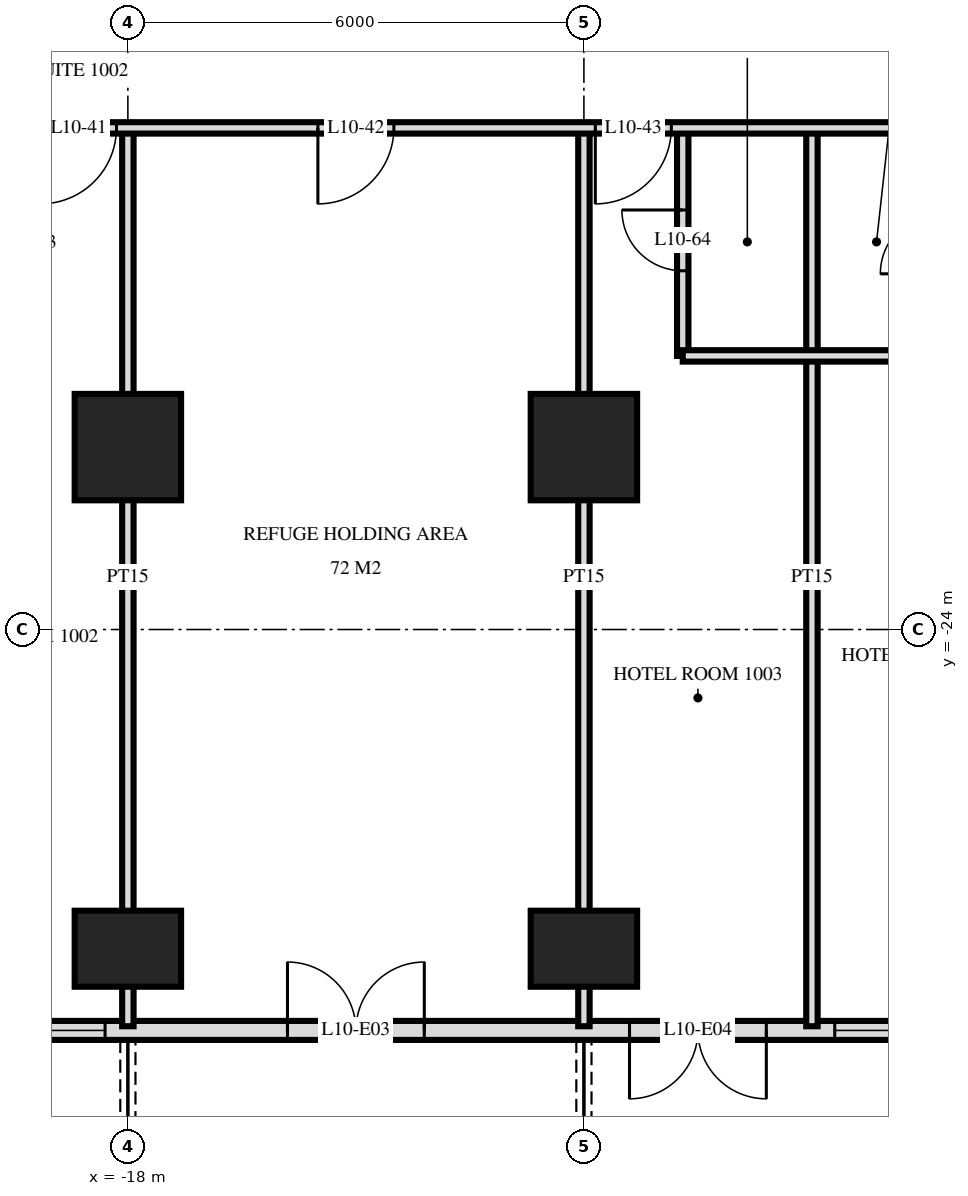
"""IFC4 building model, lengths in metres.
Left out: names, types, materials, properties, quantities, classifications, styles, units other than length and angle.
Written with IfcOpenShell. Run it as: python <this file> out.ifc"""

import sys

from ifc_helpers import new_model, si_unit, direction, frame, frame_2d, origin, origin_2d, place, context, subcontext, project, spatial, rectangle, extrude, element, fill, save


model = new_model("IFC4")
c1 = context("Model", 3, precision=1e-05, world=origin(), true_north=direction((0.0, 1.0)))
c2 = subcontext(c1, "Body", "Model", "MODEL_VIEW")
j1 = project(units=[si_unit("LENGTHUNIT", "METRE"), si_unit("PLANEANGLEUNIT", "RADIAN")], contexts=[c1])
p1 = place(None, origin())
s1 = spatial("IfcSite", under=j1, at=p1, CompositionType="ELEMENT")
p2 = place(p1, origin())
s2 = spatial("IfcBuilding", under=s1, at=p2, CompositionType="ELEMENT")
p3 = place(p2, frame((0.0, 0.0, 45.6)))
s3 = spatial("IfcBuildingStorey", under=s2, at=p3, CompositionType="ELEMENT", Elevation=45.6)
p4 = place(p3, frame((-18.0, -28.2, 0.0), z_axis=(0.0, 0.0, 1.0), x_axis=(1.0, 0.0, 0.0)))
e1 = element("IfcColumn", 1, at=p4, inside=s3, PredefinedType="COLUMN", context=c2, shape_type="SweptSolid", body=[
    extrude(rectangle(XDim=1.4, YDim=1.0, at=origin_2d()), origin(), (0.0, 0.0, 1.0), 3.6),
])
p5 = place(p3, frame((-18.0, -21.6, 0.0), z_axis=(0.0, 0.0, 1.0), x_axis=(1.0, 0.0, 0.0)))
e2 = element("IfcColumn", 2, at=p5, inside=s3, PredefinedType="COLUMN", context=c2, shape_type="SweptSolid", body=[
    extrude(rectangle(XDim=1.4, YDim=1.4, at=origin_2d()), origin(), (0.0, 0.0, 1.0), 3.6),
])
p6 = place(p3, frame((-12.0, -28.2, 0.0), z_axis=(0.0, 0.0, 1.0), x_axis=(1.0, 0.0, 0.0)))
e3 = element("IfcColumn", 3, at=p6, inside=s3, PredefinedType="COLUMN", context=c2, shape_type="SweptSolid", body=[
    extrude(rectangle(XDim=1.4, YDim=1.0, at=origin_2d()), origin(), (0.0, 0.0, 1.0), 3.6),
])
p7 = place(p3, frame((-12.0, -21.6, 0.0), z_axis=(0.0, 0.0, 1.0), x_axis=(1.0, 0.0, 0.0)))
e4 = element("IfcColumn", 4, at=p7, inside=s3, PredefinedType="COLUMN", context=c2, shape_type="SweptSolid", body=[
    extrude(rectangle(XDim=1.4, YDim=1.4, at=origin_2d()), origin(), (0.0, 0.0, 1.0), 3.6),
])
p8 = place(p3, frame((-28.775, -29.275, 0.0), z_axis=(0.0, 0.0, 1.0), x_axis=(1.0, 0.0, 0.0)))
e5 = element("IfcWall", 5, at=p8, inside=s3, PredefinedType="SOLIDWALL", context=c2, shape_type="SweptSolid", body=[
    extrude(rectangle(XDim=57.551, YDim=0.25, at=frame_2d((28.775, 0.0))), origin(), (0.0, 0.0, 1.0), 3.32),
])
p9 = place(p8, frame((0.575, 0.0, 0.0)))
e6 = element("IfcOpeningElement", 6, at=p9, cuts=e5, PredefinedType="OPENING", context=c2, shape_type="SweptSolid", body=[
    extrude(rectangle(XDim=1.8, YDim=2.4, at=frame_2d((0.9, 1.2))), frame((0.0, 0.135, 0.0), z_axis=(0.0, -1.0, 0.0), x_axis=(1.0, 0.0, 0.0)), (0.0, 0.0, 1.0), 0.27),
])
p10 = place(p8, frame((5.375, 0.0, 0.0)))
e7 = element("IfcOpeningElement", 7, at=p10, cuts=e5, PredefinedType="OPENING", context=c2, shape_type="SweptSolid", body=[
    extrude(rectangle(XDim=1.8, YDim=2.4, at=frame_2d((0.9, 1.2))), frame((0.0, 0.135, 0.0), z_axis=(0.0, -1.0, 0.0), x_axis=(1.0, 0.0, 0.0)), (0.0, 0.0, 1.0), 0.27),
])
p11 = place(p8, frame((8.075, 0.0, 0.3)))
e8 = element("IfcOpeningElement", 8, at=p11, cuts=e5, PredefinedType="OPENING", context=c2, shape_type="SweptSolid", body=[
    extrude(rectangle(XDim=2.4, YDim=2.1, at=frame_2d((1.2, 1.05))), frame((0.0, 0.135, 0.0), z_axis=(0.0, -1.0, 0.0), x_axis=(1.0, 0.0, 0.0)), (0.0, 0.0, 1.0), 0.27),
])
p12 = place(p8, frame((12.875, 0.0, 0.0)))
e9 = element("IfcOpeningElement", 9, at=p12, cuts=e5, PredefinedType="OPENING", context=c2, shape_type="SweptSolid", body=[
    extrude(rectangle(XDim=1.8, YDim=2.4, at=frame_2d((0.9, 1.2))), frame((0.0, 0.135, 0.0), z_axis=(0.0, -1.0, 0.0), x_axis=(1.0, 0.0, 0.0)), (0.0, 0.0, 1.0), 0.27),
])
p13 = place(p8, frame((17.375, 0.0, 0.0)))
e10 = element("IfcOpeningElement", 10, at=p13, cuts=e5, PredefinedType="OPENING", context=c2, shape_type="SweptSolid", body=[
    extrude(rectangle(XDim=1.8, YDim=2.4, at=frame_2d((0.9, 1.2))), frame((0.0, 0.135, 0.0), z_axis=(0.0, -1.0, 0.0), x_axis=(1.0, 0.0, 0.0)), (0.0, 0.0, 1.0), 0.27),
])
p14 = place(p8, frame((20.075, 0.0, 0.3)))
e11 = element("IfcOpeningElement", 11, at=p14, cuts=e5, PredefinedType="OPENING", context=c2, shape_type="SweptSolid", body=[
    extrude(rectangle(XDim=2.4, YDim=2.1, at=frame_2d((1.2, 1.05))), frame((0.0, 0.135, 0.0), z_axis=(0.0, -1.0, 0.0), x_axis=(1.0, 0.0, 0.0)), (0.0, 0.0, 1.0), 0.27),
])
p15 = place(p8, frame((23.075, 0.0, 0.3)))
e12 = element("IfcOpeningElement", 12, at=p15, cuts=e5, PredefinedType="OPENING", context=c2, shape_type="SweptSolid", body=[
    extrude(rectangle(XDim=2.4, YDim=2.1, at=frame_2d((1.2, 1.05))), frame((0.0, 0.135, 0.0), z_axis=(0.0, -1.0, 0.0), x_axis=(1.0, 0.0, 0.0)), (0.0, 0.0, 1.0), 0.27),
])
p16 = place(p8, frame((26.375, 0.0, 0.0)))
e13 = element("IfcOpeningElement", 13, at=p16, cuts=e5, PredefinedType="OPENING", context=c2, shape_type="SweptSolid", body=[
    extrude(rectangle(XDim=1.8, YDim=2.4, at=frame_2d((0.9, 1.2))), frame((0.0, 0.135, 0.0), z_axis=(0.0, -1.0, 0.0), x_axis=(1.0, 0.0, 0.0)), (0.0, 0.0, 1.0), 0.27),
])
p17 = place(p8, frame((29.075, 0.0, 0.3)))
e14 = element("IfcOpeningElement", 14, at=p17, cuts=e5, PredefinedType="OPENING", context=c2, shape_type="SweptSolid", body=[
    extrude(rectangle(XDim=2.4, YDim=2.1, at=frame_2d((1.2, 1.05))), frame((0.0, 0.135, 0.0), z_axis=(0.0, -1.0, 0.0), x_axis=(1.0, 0.0, 0.0)), (0.0, 0.0, 1.0), 0.27),
])
p18 = place(p8, frame((32.375, 0.0, 0.0)))
e15 = element("IfcOpeningElement", 15, at=p18, cuts=e5, PredefinedType="OPENING", context=c2, shape_type="SweptSolid", body=[
    extrude(rectangle(XDim=1.8, YDim=2.4, at=frame_2d((0.9, 1.2))), frame((0.0, 0.135, 0.0), z_axis=(0.0, -1.0, 0.0), x_axis=(1.0, 0.0, 0.0)), (0.0, 0.0, 1.0), 0.27),
])
p19 = place(p8, frame((35.375, 0.0, 0.0)))
e16 = element("IfcOpeningElement", 16, at=p19, cuts=e5, PredefinedType="OPENING", context=c2, shape_type="SweptSolid", body=[
    extrude(rectangle(XDim=1.8, YDim=2.4, at=frame_2d((0.9, 1.2))), frame((0.0, 0.135, 0.0), z_axis=(0.0, -1.0, 0.0), x_axis=(1.0, 0.0, 0.0)), (0.0, 0.0, 1.0), 0.27),
])
p20 = place(p8, frame((38.075, 0.0, 0.3)))
e17 = element("IfcOpeningElement", 17, at=p20, cuts=e5, PredefinedType="OPENING", context=c2, shape_type="SweptSolid", body=[
    extrude(rectangle(XDim=2.4, YDim=2.1, at=frame_2d((1.2, 1.05))), frame((0.0, 0.135, 0.0), z_axis=(0.0, -1.0, 0.0), x_axis=(1.0, 0.0, 0.0)), (0.0, 0.0, 1.0), 0.27),
])
p21 = place(p8, frame((41.075, 0.0, 0.3)))
e18 = element("IfcOpeningElement", 18, at=p21, cuts=e5, PredefinedType="OPENING", context=c2, shape_type="SweptSolid", body=[
    extrude(rectangle(XDim=2.4, YDim=2.1, at=frame_2d((1.2, 1.05))), frame((0.0, 0.135, 0.0), z_axis=(0.0, -1.0, 0.0), x_axis=(1.0, 0.0, 0.0)), (0.0, 0.0, 1.0), 0.27),
])
p22 = place(p8, frame((44.375, 0.0, 0.0)))
e19 = element("IfcOpeningElement", 19, at=p22, cuts=e5, PredefinedType="OPENING", context=c2, shape_type="SweptSolid", body=[
    extrude(rectangle(XDim=1.8, YDim=2.4, at=frame_2d((0.9, 1.2))), frame((0.0, 0.135, 0.0), z_axis=(0.0, -1.0, 0.0), x_axis=(1.0, 0.0, 0.0)), (0.0, 0.0, 1.0), 0.27),
])
p23 = place(p8, frame((47.075, 0.0, 0.3)))
e20 = element("IfcOpeningElement", 20, at=p23, cuts=e5, PredefinedType="OPENING", context=c2, shape_type="SweptSolid", body=[
    extrude(rectangle(XDim=2.4, YDim=2.1, at=frame_2d((1.2, 1.05))), frame((0.0, 0.135, 0.0), z_axis=(0.0, -1.0, 0.0), x_axis=(1.0, 0.0, 0.0)), (0.0, 0.0, 1.0), 0.27),
])
p24 = place(p8, frame((50.375, 0.0, 0.0)))
e21 = element("IfcOpeningElement", 21, at=p24, cuts=e5, PredefinedType="OPENING", context=c2, shape_type="SweptSolid", body=[
    extrude(rectangle(XDim=1.8, YDim=2.4, at=frame_2d((0.9, 1.2))), frame((0.0, 0.135, 0.0), z_axis=(0.0, -1.0, 0.0), x_axis=(1.0, 0.0, 0.0)), (0.0, 0.0, 1.0), 0.27),
])
p25 = place(p8, frame((53.375, 0.0, 0.0)))
e22 = element("IfcOpeningElement", 22, at=p25, cuts=e5, PredefinedType="OPENING", context=c2, shape_type="SweptSolid", body=[
    extrude(rectangle(XDim=1.8, YDim=2.4, at=frame_2d((0.9, 1.2))), frame((0.0, 0.135, 0.0), z_axis=(0.0, -1.0, 0.0), x_axis=(1.0, 0.0, 0.0)), (0.0, 0.0, 1.0), 0.27),
])
p26 = place(p3, frame((-9.0, -29.22, 0.0), z_axis=(0.0, 0.0, 1.0), x_axis=(0.0, 1.0, 0.0)))
e23 = element("IfcWall", 23, at=p26, inside=s3, PredefinedType="PARTITIONING", context=c2, shape_type="SweptSolid", body=[
    extrude(rectangle(XDim=11.82, YDim=0.15, at=frame_2d((5.91, 0.0))), origin(), (0.0, 0.0, 1.0), 3.32),
])
p27 = place(p3, frame((-10.7, -20.4, 0.0), z_axis=(0.0, 0.0, 1.0), x_axis=(0.0, 1.0, 0.0)))
e24 = element("IfcWall", 24, at=p27, inside=s3, PredefinedType="PARTITIONING", context=c2, shape_type="SweptSolid", body=[
    extrude(rectangle(XDim=3.0, YDim=0.15, at=frame_2d((1.5, 0.0))), origin(), (0.0, 0.0, 1.0), 3.32),
])
p28 = place(p27, frame((1.12, 0.0, 0.0)))
e25 = element("IfcOpeningElement", 25, at=p28, cuts=e24, PredefinedType="OPENING", context=c2, shape_type="SweptSolid", body=[
    extrude(rectangle(XDim=0.8, YDim=2.1, at=frame_2d((0.4, 1.05))), frame((0.0, 0.085, 0.0), z_axis=(0.0, -1.0, 0.0), x_axis=(1.0, 0.0, 0.0)), (0.0, 0.0, 1.0), 0.17),
])
for number, where, z_axis, x_axis in (
    (26, (-12.0, -29.22, 0.0), (0.0, 0.0, 1.0), (0.0, 1.0, 0.0)),
    (27, (-18.0, -29.22, 0.0), (0.0, 0.0, 1.0), (0.0, 1.0, 0.0)),
):
    element("IfcWall", number, at=place(p3, frame(where, z_axis=z_axis, x_axis=x_axis)), inside=s3, PredefinedType="PARTITIONING", context=c2, shape_type="SweptSolid", body=[
        extrude(rectangle(XDim=11.82, YDim=0.15, at=frame_2d((5.91, 0.0))), origin(), (0.0, 0.0, 1.0), 3.32),
    ])
p29 = place(p3, frame((-10.7, -20.4, 0.0), z_axis=(0.0, 0.0, 1.0), x_axis=(1.0, 0.0, 0.0)))
e28 = element("IfcWall", 28, at=p29, inside=s3, PredefinedType="PARTITIONING", context=c2, shape_type="SweptSolid", body=[
    extrude(rectangle(XDim=3.4, YDim=0.15, at=frame_2d((1.7, 0.0))), origin(), (0.0, 0.0, 1.0), 3.32),
])
p30 = place(p3, frame((-33.12, -17.4, 0.0), z_axis=(0.0, 0.0, 1.0), x_axis=(1.0, 0.0, 0.0)))
e29 = element("IfcWall", 29, at=p30, inside=s3, PredefinedType="PARTITIONING", context=c2, shape_type="SweptSolid", body=[
    extrude(rectangle(XDim=66.24, YDim=0.15, at=frame_2d((33.12, 0.0))), origin(), (0.0, 0.0, 1.0), 3.32),
])
p31 = place(p30, frame((9.27, 0.0, 0.0)))
e30 = element("IfcOpeningElement", 30, at=p31, cuts=e29, PredefinedType="OPENING", context=c2, shape_type="SweptSolid", body=[
    extrude(rectangle(XDim=1.0, YDim=2.1, at=frame_2d((0.5, 1.05))), frame((0.0, 0.085, 0.0), z_axis=(0.0, -1.0, 0.0), x_axis=(1.0, 0.0, 0.0)), (0.0, 0.0, 1.0), 0.17),
])
p32 = place(p30, frame((13.97, 0.0, 0.0)))
e31 = element("IfcOpeningElement", 31, at=p32, cuts=e29, PredefinedType="OPENING", context=c2, shape_type="SweptSolid", body=[
    extrude(rectangle(XDim=1.0, YDim=2.1, at=frame_2d((0.5, 1.05))), frame((0.0, 0.085, 0.0), z_axis=(0.0, -1.0, 0.0), x_axis=(1.0, 0.0, 0.0)), (0.0, 0.0, 1.0), 0.17),
])
p33 = place(p30, frame((17.62, 0.0, 0.0)))
e32 = element("IfcOpeningElement", 32, at=p33, cuts=e29, PredefinedType="OPENING", context=c2, shape_type="SweptSolid", body=[
    extrude(rectangle(XDim=1.0, YDim=2.1, at=frame_2d((0.5, 1.05))), frame((0.0, 0.085, 0.0), z_axis=(0.0, -1.0, 0.0), x_axis=(1.0, 0.0, 0.0)), (0.0, 0.0, 1.0), 0.17),
])
p34 = place(p30, frame((21.27, 0.0, 0.0)))
e33 = element("IfcOpeningElement", 33, at=p34, cuts=e29, PredefinedType="OPENING", context=c2, shape_type="SweptSolid", body=[
    extrude(rectangle(XDim=1.0, YDim=2.1, at=frame_2d((0.5, 1.05))), frame((0.0, 0.085, 0.0), z_axis=(0.0, -1.0, 0.0), x_axis=(1.0, 0.0, 0.0)), (0.0, 0.0, 1.0), 0.17),
])
p35 = place(p30, frame((25.97, 0.0, 0.0)))
e34 = element("IfcOpeningElement", 34, at=p35, cuts=e29, PredefinedType="OPENING", context=c2, shape_type="SweptSolid", body=[
    extrude(rectangle(XDim=1.0, YDim=2.1, at=frame_2d((0.5, 1.05))), frame((0.0, 0.085, 0.0), z_axis=(0.0, -1.0, 0.0), x_axis=(1.0, 0.0, 0.0)), (0.0, 0.0, 1.0), 0.17),
])
p36 = place(p30, frame((35.62, 0.0, 0.0)))
e35 = element("IfcOpeningElement", 35, at=p36, cuts=e29, PredefinedType="OPENING", context=c2, shape_type="SweptSolid", body=[
    extrude(rectangle(XDim=1.0, YDim=2.1, at=frame_2d((0.5, 1.05))), frame((0.0, 0.085, 0.0), z_axis=(0.0, -1.0, 0.0), x_axis=(1.0, 0.0, 0.0)), (0.0, 0.0, 1.0), 0.17),
])
p37 = place(p30, frame((40.97, 0.0, 0.0)))
e36 = element("IfcOpeningElement", 36, at=p37, cuts=e29, PredefinedType="OPENING", context=c2, shape_type="SweptSolid", body=[
    extrude(rectangle(XDim=1.0, YDim=2.1, at=frame_2d((0.5, 1.05))), frame((0.0, 0.085, 0.0), z_axis=(0.0, -1.0, 0.0), x_axis=(1.0, 0.0, 0.0)), (0.0, 0.0, 1.0), 0.17),
])
p38 = place(p30, frame((42.27, 0.0, 0.0)))
e37 = element("IfcOpeningElement", 37, at=p38, cuts=e29, PredefinedType="OPENING", context=c2, shape_type="SweptSolid", body=[
    extrude(rectangle(XDim=1.0, YDim=2.1, at=frame_2d((0.5, 1.05))), frame((0.0, 0.085, 0.0), z_axis=(0.0, -1.0, 0.0), x_axis=(1.0, 0.0, 0.0)), (0.0, 0.0, 1.0), 0.17),
])
p39 = place(p30, frame((49.72, 0.0, 0.0)))
e38 = element("IfcOpeningElement", 38, at=p39, cuts=e29, PredefinedType="OPENING", context=c2, shape_type="SweptSolid", body=[
    extrude(rectangle(XDim=1.0, YDim=2.1, at=frame_2d((0.5, 1.05))), frame((0.0, 0.085, 0.0), z_axis=(0.0, -1.0, 0.0), x_axis=(1.0, 0.0, 0.0)), (0.0, 0.0, 1.0), 0.17),
])
p40 = place(p30, frame((51.27, 0.0, 0.0)))
e39 = element("IfcOpeningElement", 39, at=p40, cuts=e29, PredefinedType="OPENING", context=c2, shape_type="SweptSolid", body=[
    extrude(rectangle(XDim=1.0, YDim=2.1, at=frame_2d((0.5, 1.05))), frame((0.0, 0.085, 0.0), z_axis=(0.0, -1.0, 0.0), x_axis=(1.0, 0.0, 0.0)), (0.0, 0.0, 1.0), 0.17),
])
p41 = place(p30, frame((4.42, 0.0, 0.0)))
e40 = element("IfcOpeningElement", 40, at=p41, cuts=e29, PredefinedType="OPENING", context=c2, shape_type="SweptSolid", body=[
    extrude(rectangle(XDim=1.0, YDim=2.1, at=frame_2d((0.5, 1.05))), frame((0.0, 0.085, 0.0), z_axis=(0.0, -1.0, 0.0), x_axis=(1.0, 0.0, 0.0)), (0.0, 0.0, 1.0), 0.17),
])
p42 = place(p30, frame((54.82, 0.0, 0.0)))
e41 = element("IfcOpeningElement", 41, at=p42, cuts=e29, PredefinedType="OPENING", context=c2, shape_type="SweptSolid", body=[
    extrude(rectangle(XDim=1.0, YDim=2.1, at=frame_2d((0.5, 1.05))), frame((0.0, 0.085, 0.0), z_axis=(0.0, -1.0, 0.0), x_axis=(1.0, 0.0, 0.0)), (0.0, 0.0, 1.0), 0.17),
])
p43 = place(p11, origin())
e42 = element("IfcWindow", 42, at=p43, inside=s3, PartitioningType="SINGLE_PANEL", PredefinedType="WINDOW", context=c2, shape_type="SweptSolid", body=[
    extrude(rectangle(XDim=2.4, YDim=2.1, at=frame_2d((1.2, 1.05))), frame((0.0, 0.03, 0.0), z_axis=(0.0, -1.0, 0.0), x_axis=(1.0, 0.0, 0.0)), (0.0, 0.0, 1.0), 0.06),
])
fill(e8, e42)
p44 = place(p12, origin())
e43 = element("IfcDoor", 43, at=p44, inside=s3, OperationType="DOUBLE_DOOR_SINGLE_SWING", PredefinedType="DOOR", context=c2, shape_type="SweptSolid", body=[
    extrude(rectangle(XDim=1.8, YDim=2.4, at=frame_2d((0.9, 1.2))), frame((0.0, 0.025, 0.0), z_axis=(0.0, -1.0, 0.0), x_axis=(1.0, 0.0, 0.0)), (0.0, 0.0, 1.0), 0.05),
])
fill(e9, e43)
p45 = place(p13, frame((0.9, 0.0, 0.0), z_axis=(0.0, 0.0, 1.0), x_axis=(-1.0, 0.0, 0.0)))
e44 = element("IfcDoor", 44, at=p45, inside=s3, OperationType="DOUBLE_DOOR_SINGLE_SWING", PredefinedType="DOOR", context=c2, shape_type="SweptSolid", body=[
    extrude(rectangle(XDim=1.8, YDim=2.4, at=frame_2d((0.0, 1.2))), frame((0.0, -0.025, 0.0), z_axis=(0.0, 1.0, 0.0), x_axis=(-1.0, 0.0, 0.0)), (0.0, 0.0, 1.0), 0.05),
])
fill(e10, e44)
p46 = place(p14, origin())
e45 = element("IfcWindow", 45, at=p46, inside=s3, PartitioningType="SINGLE_PANEL", PredefinedType="WINDOW", context=c2, shape_type="SweptSolid", body=[
    extrude(rectangle(XDim=2.4, YDim=2.1, at=frame_2d((1.2, 1.05))), frame((0.0, 0.03, 0.0), z_axis=(0.0, -1.0, 0.0), x_axis=(1.0, 0.0, 0.0)), (0.0, 0.0, 1.0), 0.06),
])
fill(e11, e45)
p47 = place(p32, frame((0.5, 0.0, 0.0), z_axis=(0.0, 0.0, 1.0), x_axis=(-1.0, 0.0, 0.0)))
e46 = element("IfcDoor", 46, at=p47, inside=s3, OperationType="SINGLE_SWING_LEFT", PredefinedType="DOOR", context=c2, shape_type="SweptSolid", body=[
    extrude(rectangle(XDim=1.0, YDim=2.1, at=frame_2d((0.0, 1.05))), frame((0.0, -0.025, 0.0), z_axis=(0.0, 1.0, 0.0), x_axis=(-1.0, 0.0, 0.0)), (0.0, 0.0, 1.0), 0.05),
])
fill(e31, e46)
p48 = place(p33, frame((0.5, 0.0, 0.0), z_axis=(0.0, 0.0, 1.0), x_axis=(-1.0, 0.0, 0.0)))
e47 = element("IfcDoor", 47, at=p48, inside=s3, OperationType="SINGLE_SWING_LEFT", PredefinedType="DOOR", context=c2, shape_type="SweptSolid", body=[
    extrude(rectangle(XDim=1.0, YDim=2.1, at=frame_2d((0.0, 1.05))), frame((0.0, -0.025, 0.0), z_axis=(0.0, 1.0, 0.0), x_axis=(-1.0, 0.0, 0.0)), (0.0, 0.0, 1.0), 0.05),
])
fill(e32, e47)
p49 = place(p34, frame((0.5, 0.0, 0.0), z_axis=(0.0, 0.0, 1.0), x_axis=(-1.0, 0.0, 0.0)))
e48 = element("IfcDoor", 48, at=p49, inside=s3, OperationType="SINGLE_SWING_LEFT", PredefinedType="DOOR", context=c2, shape_type="SweptSolid", body=[
    extrude(rectangle(XDim=1.0, YDim=2.1, at=frame_2d((0.0, 1.05))), frame((0.0, -0.025, 0.0), z_axis=(0.0, 1.0, 0.0), x_axis=(-1.0, 0.0, 0.0)), (0.0, 0.0, 1.0), 0.05),
])
fill(e33, e48)
p50 = place(p28, origin())
e49 = element("IfcDoor", 49, at=p50, inside=s3, OperationType="SINGLE_SWING_LEFT", PredefinedType="DOOR", context=c2, shape_type="SweptSolid", body=[
    extrude(rectangle(XDim=0.8, YDim=2.1, at=frame_2d((0.4, 1.05))), frame((0.0, 0.025, 0.0), z_axis=(0.0, -1.0, 0.0), x_axis=(1.0, 0.0, 0.0)), (0.0, 0.0, 1.0), 0.05),
])
fill(e25, e49)
save(model, sys.argv[1])
